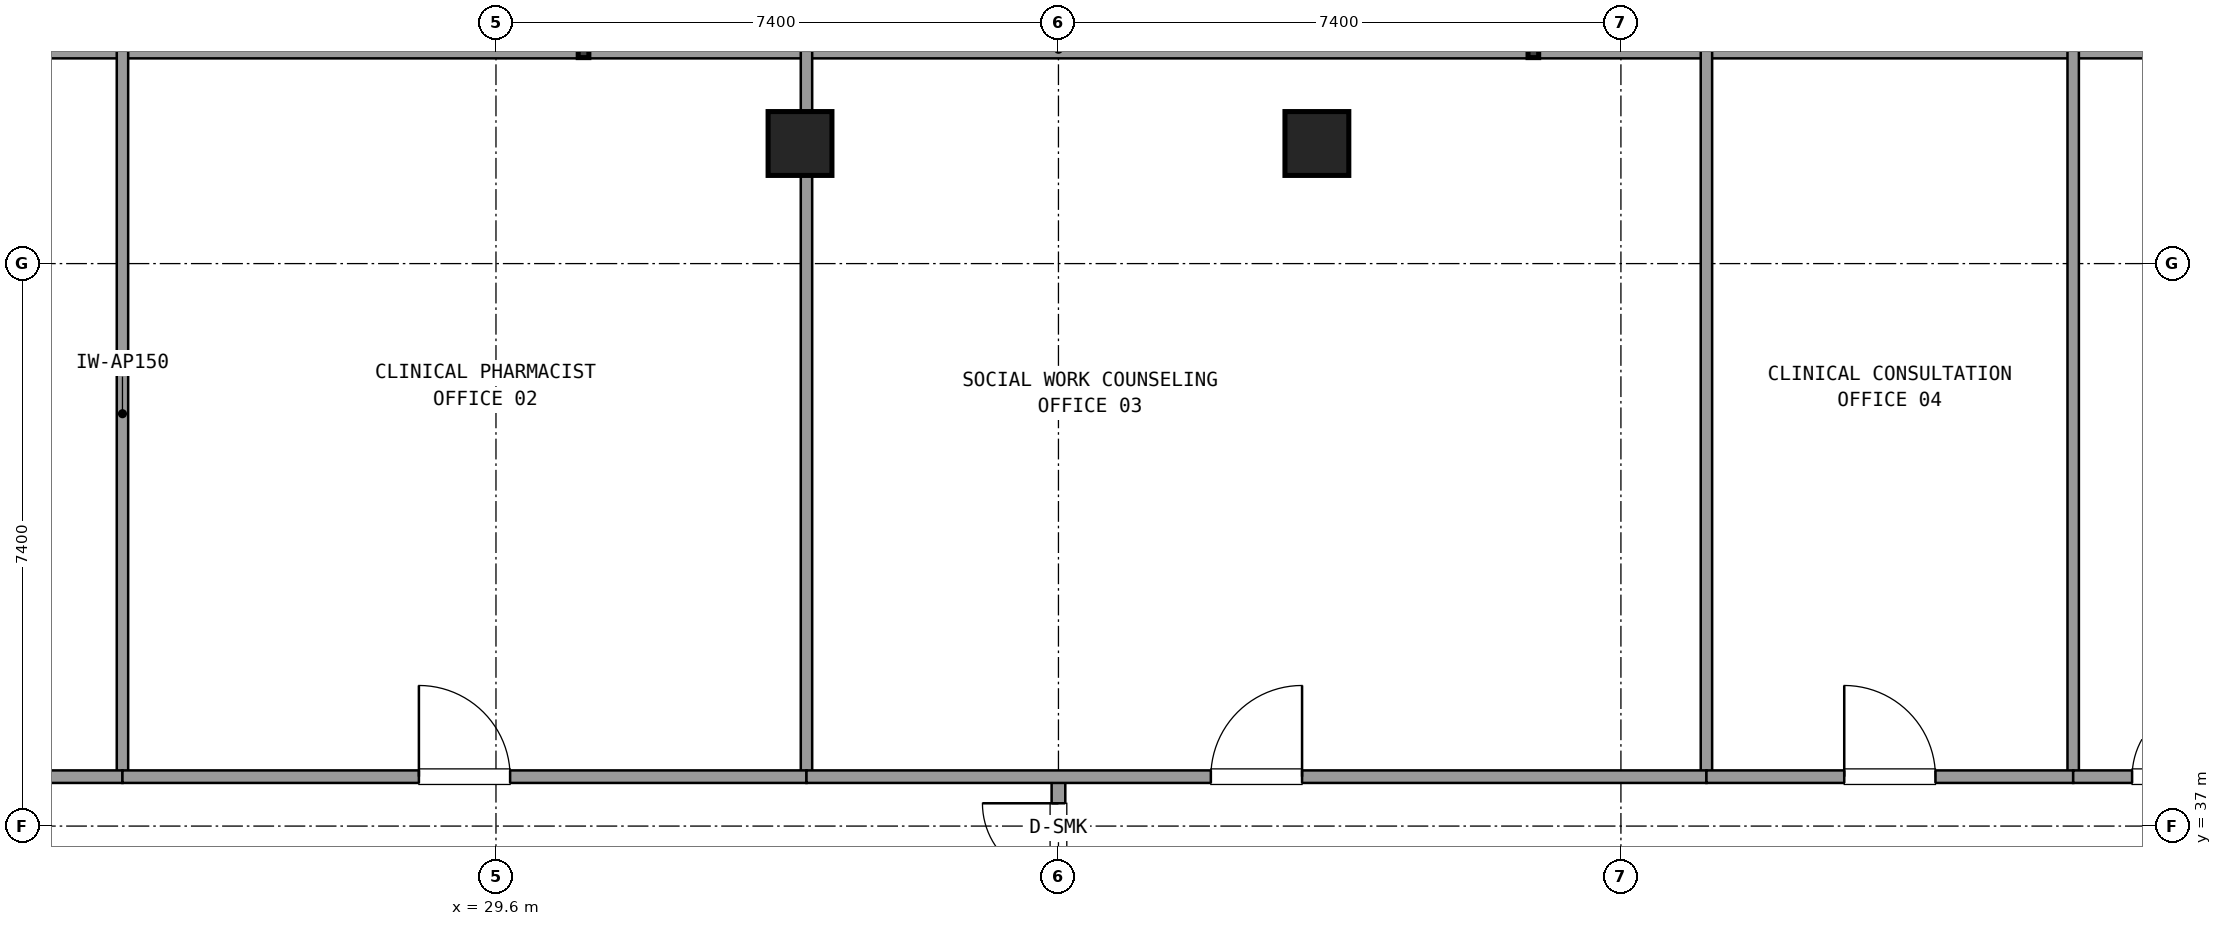
"""IFC4 building model, lengths in metres.
Left out: names, types, materials, properties, quantities, classifications, styles, units other than length and angle.
Written with IfcOpenShell. Run it as: python <this file> out.ifc"""

import sys

from ifc_helpers import new_model, si_unit, direction, frame, frame_2d, origin, origin_2d, place, context, subcontext, project, spatial, rectangle, extrude, element, fill, save


model = new_model("IFC4")
c1 = context("Model", 3, precision=1e-05, world=origin(), true_north=direction((0.0, 1.0)))
c2 = subcontext(c1, "Body", "Model", "MODEL_VIEW")
j1 = project(units=[si_unit("LENGTHUNIT", "METRE"), si_unit("PLANEANGLEUNIT", "RADIAN")], contexts=[c1])
p1 = place(None, origin())
s1 = spatial("IfcSite", under=j1, at=p1, CompositionType="ELEMENT")
p2 = place(p1, origin())
s2 = spatial("IfcBuilding", under=s1, at=p2, CompositionType="ELEMENT")
p3 = place(p2, frame((0.0, 0.0, 250.02)))
s3 = spatial("IfcBuildingStorey", under=s2, at=p3, CompositionType="ELEMENT", Elevation=250.02)
for number, where, z_axis, x_axis in (
    (1, (40.4, 45.98, 0.0), (0.0, 0.0, 1.0), (1.0, 0.0, 0.0)),
    (2, (33.6, 45.98, 0.0), (0.0, 0.0, 1.0), (1.0, 0.0, 0.0)),
):
    element("IfcColumn", number, at=place(p3, frame(where, z_axis=z_axis, x_axis=x_axis)), inside=s3, PredefinedType="COLUMN", context=c2, shape_type="SweptSolid", body=[
        extrude(rectangle(XDim=0.84, YDim=0.84, at=origin_2d()), origin(), (0.0, 0.0, 1.0), 3.6),
    ])
p4 = place(p3, frame((55.745, 47.22, 0.0), z_axis=(0.0, 0.0, 1.0), x_axis=(-1.0, 0.0, 0.0)))
e3 = element("IfcWall", 3, at=p4, inside=s3, PredefinedType="SOLIDWALL", context=c2, shape_type="SweptSolid", body=[
    extrude(rectangle(XDim=37.49, YDim=0.24, at=frame_2d((18.745, 0.0))), origin(), (0.0, 0.0, 1.0), 0.85),
])
p5 = place(p3, frame((37.0, 34.95, 0.0), z_axis=(0.0, 0.0, 1.0), x_axis=(0.0, 1.0, 0.0)))
e4 = element("IfcWall", 4, at=p5, inside=s3, PredefinedType="PARTITIONING", context=c2, shape_type="SweptSolid", body=[
    extrude(rectangle(XDim=2.7, YDim=0.18, at=frame_2d((1.35, 0.0))), origin(), (0.0, 0.0, 1.0), 2.61),
])
p6 = place(p5, frame((0.35, 0.0, 0.0)))
e5 = element("IfcOpeningElement", 5, at=p6, cuts=e4, PredefinedType="OPENING", context=c2, shape_type="SweptSolid", body=[
    extrude(rectangle(XDim=2.0, YDim=2.2, at=frame_2d((1.0, 1.1))), frame((0.0, 0.1, 0.0), z_axis=(0.0, -1.0, 0.0), x_axis=(1.0, 0.0, 0.0)), (0.0, 0.0, 1.0), 0.2),
])
p7 = place(p3, frame((24.686, 37.65, 0.0), z_axis=(0.0, 0.0, 1.0), x_axis=(0.0, 1.0, 0.0)))
e6 = element("IfcWall", 6, at=p7, inside=s3, PredefinedType="PARTITIONING", context=c2, shape_type="SweptSolid", body=[
    extrude(rectangle(XDim=9.55, YDim=0.15, at=frame_2d((4.775, 0.0))), origin(), (0.0, 0.0, 1.0), 2.61),
])
p8 = place(p3, frame((21.1, 37.65, 0.0), z_axis=(0.0, 0.0, 1.0), x_axis=(1.0, 0.0, 0.0)))
e7 = element("IfcWall", 7, at=p8, inside=s3, PredefinedType="PARTITIONING", context=c2, shape_type="SweptSolid", body=[
    extrude(rectangle(XDim=3.586, YDim=0.165, at=frame_2d((1.793, 0.0))), origin(), (0.0, 0.0, 1.0), 2.61),
])
p9 = place(p8, frame((1.193, 0.0, 0.0)))
e8 = element("IfcOpeningElement", 8, at=p9, cuts=e7, PredefinedType="OPENING", context=c2, shape_type="SweptSolid", body=[
    extrude(rectangle(XDim=1.2, YDim=2.15, at=frame_2d((0.6, 1.075))), frame((0.0, 0.093, 0.0), z_axis=(0.0, -1.0, 0.0), x_axis=(1.0, 0.0, 0.0)), (0.0, 0.0, 1.0), 0.185),
])
p10 = place(p3, frame((33.685, 37.65, 0.0), z_axis=(0.0, 0.0, 1.0), x_axis=(0.0, 1.0, 0.0)))
e9 = element("IfcWall", 9, at=p10, inside=s3, PredefinedType="PARTITIONING", context=c2, shape_type="SweptSolid", body=[
    extrude(rectangle(XDim=9.55, YDim=0.15, at=frame_2d((4.775, 0.0))), origin(), (0.0, 0.0, 1.0), 2.61),
])
p11 = place(p3, frame((24.686, 37.65, 0.0), z_axis=(0.0, 0.0, 1.0), x_axis=(1.0, 0.0, 0.0)))
e10 = element("IfcWall", 10, at=p11, inside=s3, PredefinedType="PARTITIONING", context=c2, shape_type="SweptSolid", body=[
    extrude(rectangle(XDim=8.999, YDim=0.165, at=frame_2d((4.5, 0.0))), origin(), (0.0, 0.0, 1.0), 2.61),
])
p12 = place(p11, frame((3.9, 0.0, 0.0)))
e11 = element("IfcOpeningElement", 11, at=p12, cuts=e10, PredefinedType="OPENING", context=c2, shape_type="SweptSolid", body=[
    extrude(rectangle(XDim=1.2, YDim=2.15, at=frame_2d((0.6, 1.075))), frame((0.0, 0.093, 0.0), z_axis=(0.0, -1.0, 0.0), x_axis=(1.0, 0.0, 0.0)), (0.0, 0.0, 1.0), 0.185),
])
p13 = place(p3, frame((45.525, 37.65, 0.0), z_axis=(0.0, 0.0, 1.0), x_axis=(0.0, 1.0, 0.0)))
e12 = element("IfcWall", 12, at=p13, inside=s3, PredefinedType="PARTITIONING", context=c2, shape_type="SweptSolid", body=[
    extrude(rectangle(XDim=9.55, YDim=0.15, at=frame_2d((4.775, 0.0))), origin(), (0.0, 0.0, 1.0), 2.61),
])
p14 = place(p3, frame((33.685, 37.65, 0.0), z_axis=(0.0, 0.0, 1.0), x_axis=(1.0, 0.0, 0.0)))
e13 = element("IfcWall", 13, at=p14, inside=s3, PredefinedType="PARTITIONING", context=c2, shape_type="SweptSolid", body=[
    extrude(rectangle(XDim=11.84, YDim=0.165, at=frame_2d((5.92, 0.0))), origin(), (0.0, 0.0, 1.0), 2.61),
])
p15 = place(p14, frame((5.32, 0.0, 0.0)))
e14 = element("IfcOpeningElement", 14, at=p15, cuts=e13, PredefinedType="OPENING", context=c2, shape_type="SweptSolid", body=[
    extrude(rectangle(XDim=1.2, YDim=2.15, at=frame_2d((0.6, 1.075))), frame((0.0, 0.093, 0.0), z_axis=(0.0, -1.0, 0.0), x_axis=(1.0, 0.0, 0.0)), (0.0, 0.0, 1.0), 0.185),
])
p16 = place(p3, frame((50.35, 37.65, 0.0), z_axis=(0.0, 0.0, 1.0), x_axis=(0.0, 1.0, 0.0)))
e15 = element("IfcWall", 15, at=p16, inside=s3, PredefinedType="PARTITIONING", context=c2, shape_type="SweptSolid", body=[
    extrude(rectangle(XDim=9.55, YDim=0.15, at=frame_2d((4.775, 0.0))), origin(), (0.0, 0.0, 1.0), 2.61),
])
p17 = place(p3, frame((45.525, 37.65, 0.0), z_axis=(0.0, 0.0, 1.0), x_axis=(1.0, 0.0, 0.0)))
e16 = element("IfcWall", 16, at=p17, inside=s3, PredefinedType="PARTITIONING", context=c2, shape_type="SweptSolid", body=[
    extrude(rectangle(XDim=4.825, YDim=0.165, at=frame_2d((2.413, 0.0))), origin(), (0.0, 0.0, 1.0), 2.61),
])
p18 = place(p17, frame((1.813, 0.0, 0.0)))
e17 = element("IfcOpeningElement", 17, at=p18, cuts=e16, PredefinedType="OPENING", context=c2, shape_type="SweptSolid", body=[
    extrude(rectangle(XDim=1.2, YDim=2.15, at=frame_2d((0.6, 1.075))), frame((0.0, 0.093, 0.0), z_axis=(0.0, -1.0, 0.0), x_axis=(1.0, 0.0, 0.0)), (0.0, 0.0, 1.0), 0.185),
])
p19 = place(p3, frame((50.35, 37.65, 0.0), z_axis=(0.0, 0.0, 1.0), x_axis=(1.0, 0.0, 0.0)))
e18 = element("IfcWall", 18, at=p19, inside=s3, PredefinedType="PARTITIONING", context=c2, shape_type="SweptSolid", body=[
    extrude(rectangle(XDim=2.55, YDim=0.165, at=frame_2d((1.275, 0.0))), origin(), (0.0, 0.0, 1.0), 2.61),
])
p20 = place(p19, frame((0.775, 0.0, 0.0)))
e19 = element("IfcOpeningElement", 19, at=p20, cuts=e18, PredefinedType="OPENING", context=c2, shape_type="SweptSolid", body=[
    extrude(rectangle(XDim=1.0, YDim=2.15, at=frame_2d((0.5, 1.075))), frame((0.0, 0.093, 0.0), z_axis=(0.0, -1.0, 0.0), x_axis=(1.0, 0.0, 0.0)), (0.0, 0.0, 1.0), 0.185),
])
p21 = place(p6, origin())
e20 = element("IfcDoor", 20, at=p21, inside=s3, OperationType="DOUBLE_DOOR_SINGLE_SWING", PredefinedType="DOOR", context=c2, shape_type="SweptSolid", body=[
    extrude(rectangle(XDim=2.0, YDim=2.2, at=frame_2d((1.0, 1.1))), frame((0.0, 0.025, 0.0), z_axis=(0.0, -1.0, 0.0), x_axis=(1.0, 0.0, 0.0)), (0.0, 0.0, 1.0), 0.05),
])
fill(e5, e20)
p22 = place(p12, origin())
e21 = element("IfcDoor", 21, at=p22, inside=s3, OperationType="SINGLE_SWING_LEFT", PredefinedType="DOOR", context=c2, shape_type="SweptSolid", body=[
    extrude(rectangle(XDim=1.2, YDim=2.15, at=frame_2d((0.6, 1.075))), frame((0.0, 0.025, 0.0), z_axis=(0.0, -1.0, 0.0), x_axis=(1.0, 0.0, 0.0)), (0.0, 0.0, 1.0), 0.05),
])
fill(e11, e21)
p23 = place(p15, origin())
e22 = element("IfcDoor", 22, at=p23, inside=s3, OperationType="SINGLE_SWING_RIGHT", PredefinedType="DOOR", context=c2, shape_type="SweptSolid", body=[
    extrude(rectangle(XDim=1.2, YDim=2.15, at=frame_2d((0.6, 1.075))), frame((0.0, 0.025, 0.0), z_axis=(0.0, -1.0, 0.0), x_axis=(1.0, 0.0, 0.0)), (0.0, 0.0, 1.0), 0.05),
])
fill(e14, e22)
p24 = place(p18, origin())
e23 = element("IfcDoor", 23, at=p24, inside=s3, OperationType="SINGLE_SWING_LEFT", PredefinedType="DOOR", context=c2, shape_type="SweptSolid", body=[
    extrude(rectangle(XDim=1.2, YDim=2.15, at=frame_2d((0.6, 1.075))), frame((0.0, 0.025, 0.0), z_axis=(0.0, -1.0, 0.0), x_axis=(1.0, 0.0, 0.0)), (0.0, 0.0, 1.0), 0.05),
])
fill(e17, e23)
p25 = place(p20, origin())
e24 = element("IfcDoor", 24, at=p25, inside=s3, OperationType="SINGLE_SWING_RIGHT", PredefinedType="DOOR", context=c2, shape_type="SweptSolid", body=[
    extrude(rectangle(XDim=1.0, YDim=2.15, at=frame_2d((0.5, 1.075))), frame((0.0, 0.025, 0.0), z_axis=(0.0, -1.0, 0.0), x_axis=(1.0, 0.0, 0.0)), (0.0, 0.0, 1.0), 0.05),
])
fill(e19, e24)
save(model, sys.argv[1])
